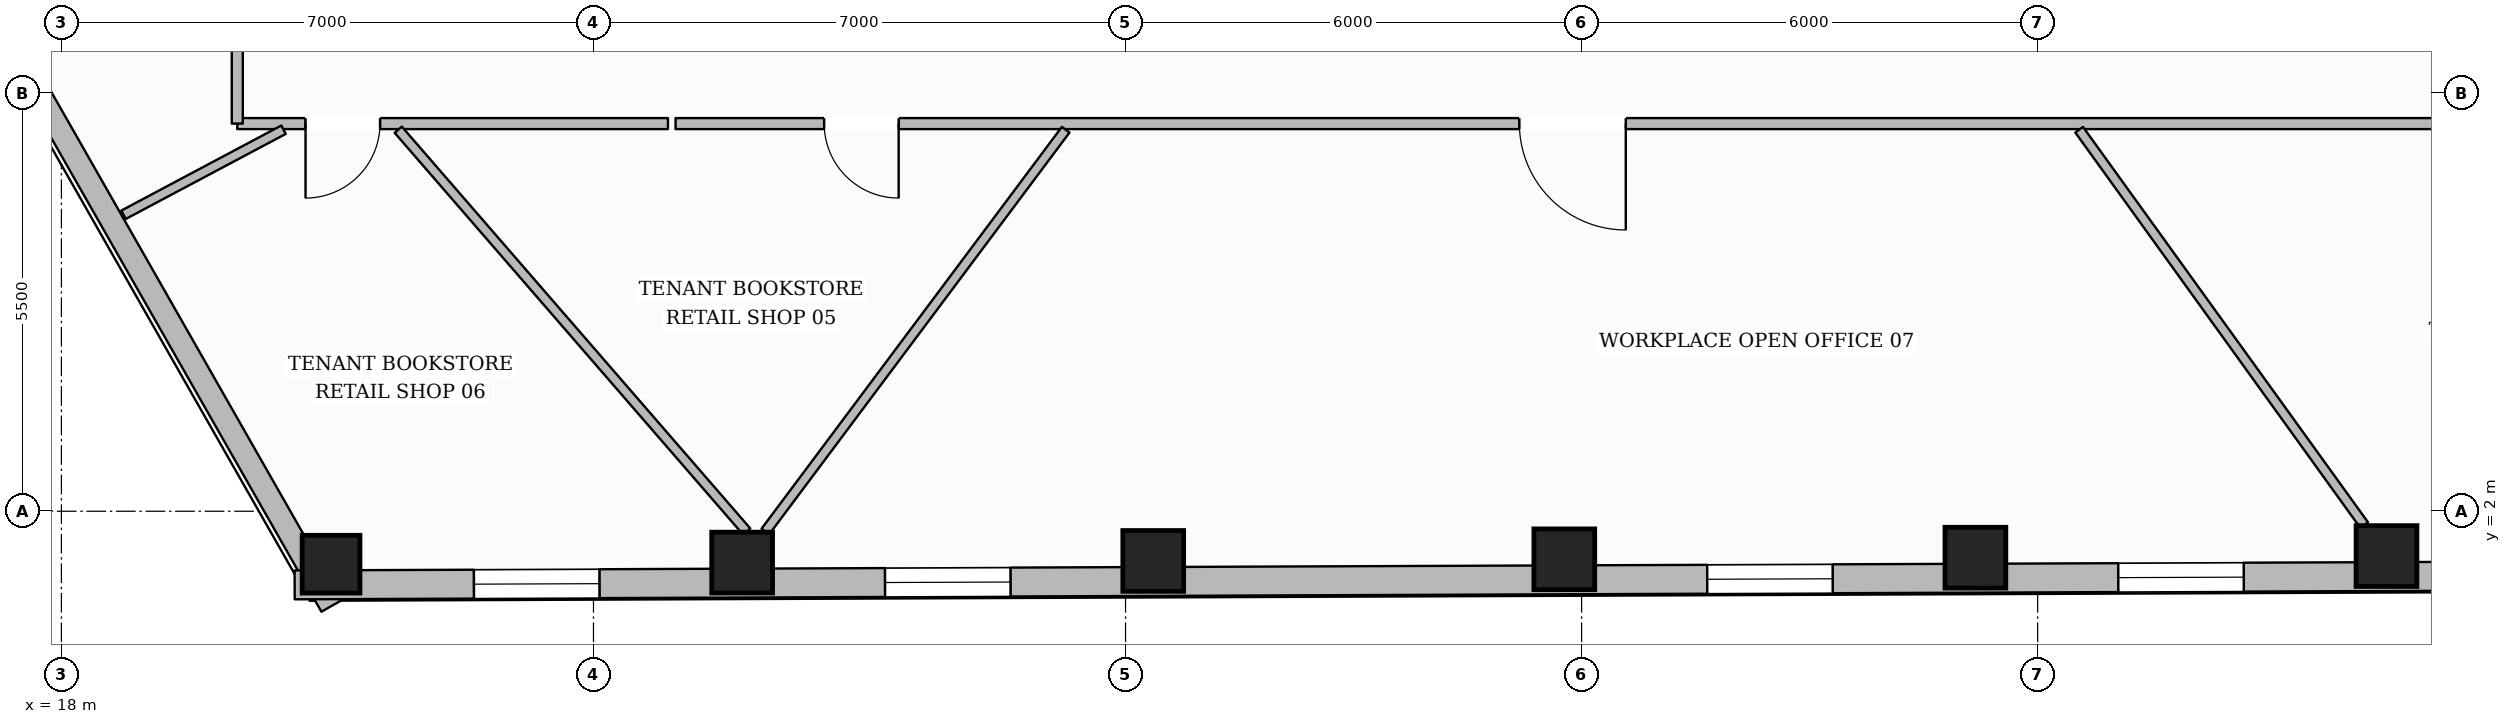
"""IFC4 building model, lengths in metres.
Left out: names, types, materials, properties, quantities, classifications, styles, units other than length and angle.
Written with IfcOpenShell. Run it as: python <this file> out.ifc"""

import sys

from ifc_helpers import new_model, si_unit, direction, frame, frame_2d, origin, origin_2d, place, context, subcontext, project, spatial, rectangle, hollow_rectangle, extrude, element, fill, save


model = new_model("IFC4")
c1 = context("Model", 3, precision=1e-05, world=origin(), true_north=direction((0.0, 1.0)))
c2 = subcontext(c1, "Body", "Model", "MODEL_VIEW")
j1 = project(units=[si_unit("LENGTHUNIT", "METRE"), si_unit("PLANEANGLEUNIT", "RADIAN")], contexts=[c1])
p1 = place(None, origin())
s1 = spatial("IfcSite", under=j1, at=p1, CompositionType="ELEMENT")
p2 = place(p1, origin())
s2 = spatial("IfcBuilding", under=s1, at=p2, CompositionType="ELEMENT")
p3 = place(p2, frame((0.0, 0.0, 13.7)))
s3 = spatial("IfcBuildingStorey", under=s2, at=p3, CompositionType="ELEMENT", Elevation=13.7)
p4 = place(p3, frame((21.548, 1.303, 0.0), z_axis=(0.0, 0.0, 1.0), x_axis=(1.0, 0.0, 0.0)))
e1 = element("IfcColumn", 1, at=p4, inside=s3, PredefinedType="COLUMN", context=c2, shape_type="SweptSolid", body=[
    extrude(hollow_rectangle(XDim=0.76, YDim=0.76, WallThickness=0.035, at=origin_2d()), origin(), (0.0, 0.0, 1.0), 3.59),
])
for number, where, z_axis, x_axis in (
    (2, (26.956, 1.325, 0.0), (0.0, 0.0, 1.0), (1.0, 0.0, 0.0)),
    (3, (32.364, 1.346, 0.0), (0.0, 0.0, 1.0), (1.0, 0.0, 0.0)),
    (4, (37.772, 1.368, 0.0), (0.0, 0.0, 1.0), (1.0, 0.0, 0.0)),
    (5, (43.181, 1.389, 0.0), (0.0, 0.0, 1.0), (1.0, 0.0, 0.0)),
    (6, (48.589, 1.41, 0.0), (0.0, 0.0, 1.0), (1.0, 0.0, 0.0)),
):
    element("IfcColumn", number, at=place(p3, frame(where, z_axis=z_axis, x_axis=x_axis)), inside=s3, PredefinedType="COLUMN", context=c2, shape_type="SweptSolid", body=[
        extrude(hollow_rectangle(XDim=0.8, YDim=0.8, WallThickness=0.036, at=origin_2d()), origin(), (0.0, 0.0, 1.0), 3.59),
    ])
p5 = place(p3, frame((21.551, 0.752, 0.0), z_axis=(0.0, 0.0, 1.0), x_axis=(-0.495301001615, 0.868721427041, 0.0)))
e7 = element("IfcWall", 7, at=p5, inside=s3, PredefinedType="STANDARD", context=c2, shape_type="SweptSolid", body=[
    extrude(rectangle(XDim=17.042, YDim=0.3, at=frame_2d((8.521, 0.0))), origin(), (0.0, 0.0, 1.0), 2.97),
])
p6 = place(p5, frame((7.921, 0.0, 0.65)))
e8 = element("IfcOpeningElement", 8, at=p6, cuts=e7, PredefinedType="OPENING", context=c2, shape_type="SweptSolid", body=[
    extrude(rectangle(XDim=1.2, YDim=1.7, at=frame_2d((0.6, 0.85))), frame((0.0, 0.16, 0.0), z_axis=(0.0, -1.0, 0.0), x_axis=(1.0, 0.0, 0.0)), (0.0, 0.0, 1.0), 0.32),
])
p7 = place(p3, frame((54.475, 1.164, 0.0), z_axis=(0.0, 0.0, 1.0), x_axis=(-0.999992126113, -0.003968338725, 0.0)))
e9 = element("IfcWall", 9, at=p7, inside=s3, PredefinedType="STANDARD", context=c2, shape_type="SweptSolid", body=[
    extrude(rectangle(XDim=33.406, YDim=0.38, at=frame_2d((16.703, 0.0))), origin(), (0.0, 0.0, 1.0), 2.97),
])
p8 = place(p7, frame((29.397, 0.0, 0.65)))
e10 = element("IfcOpeningElement", 10, at=p8, cuts=e9, PredefinedType="OPENING", context=c2, shape_type="SweptSolid", body=[
    extrude(rectangle(XDim=1.65, YDim=1.75, at=frame_2d((0.825, 0.875))), frame((0.0, 0.2, 0.0), z_axis=(0.0, -1.0, 0.0), x_axis=(1.0, 0.0, 0.0)), (0.0, 0.0, 1.0), 0.4),
])
p9 = place(p7, frame((23.989, 0.0, 0.65)))
e11 = element("IfcOpeningElement", 11, at=p9, cuts=e9, PredefinedType="OPENING", context=c2, shape_type="SweptSolid", body=[
    extrude(rectangle(XDim=1.65, YDim=1.75, at=frame_2d((0.825, 0.875))), frame((0.0, 0.2, 0.0), z_axis=(0.0, -1.0, 0.0), x_axis=(1.0, 0.0, 0.0)), (0.0, 0.0, 1.0), 0.4),
])
p10 = place(p7, frame((13.172, 0.0, 0.65)))
e12 = element("IfcOpeningElement", 12, at=p10, cuts=e9, PredefinedType="OPENING", context=c2, shape_type="SweptSolid", body=[
    extrude(rectangle(XDim=1.65, YDim=1.75, at=frame_2d((0.825, 0.875))), frame((0.0, 0.2, 0.0), z_axis=(0.0, -1.0, 0.0), x_axis=(1.0, 0.0, 0.0)), (0.0, 0.0, 1.0), 0.4),
])
p11 = place(p7, frame((7.764, 0.0, 0.65)))
e13 = element("IfcOpeningElement", 13, at=p11, cuts=e9, PredefinedType="OPENING", context=c2, shape_type="SweptSolid", body=[
    extrude(rectangle(XDim=1.65, YDim=1.75, at=frame_2d((0.825, 0.875))), frame((0.0, 0.2, 0.0), z_axis=(0.0, -1.0, 0.0), x_axis=(1.0, 0.0, 0.0)), (0.0, 0.0, 1.0), 0.4),
])
p12 = place(p7, frame((2.355, 0.0, 0.65)))
e14 = element("IfcOpeningElement", 14, at=p12, cuts=e9, PredefinedType="OPENING", context=c2, shape_type="SweptSolid", body=[
    extrude(rectangle(XDim=1.65, YDim=1.75, at=frame_2d((0.825, 0.875))), frame((0.0, 0.2, 0.0), z_axis=(0.0, -1.0, 0.0), x_axis=(1.0, 0.0, 0.0)), (0.0, 0.0, 1.0), 0.4),
])
p13 = place(p3, frame((49.92, 7.1, 0.0), z_axis=(0.0, 0.0, 1.0), x_axis=(-1.0, 0.0, 0.0)))
e15 = element("IfcWall", 15, at=p13, inside=s3, PredefinedType="PARTITIONING", context=c2, shape_type="SweptSolid", body=[
    extrude(rectangle(XDim=23.84, YDim=0.145, at=frame_2d((11.92, 0.0))), origin(), (0.0, 0.0, 1.0), 3.278),
])
p14 = place(p13, frame((20.905, 0.0, 0.0)))
e16 = element("IfcOpeningElement", 16, at=p14, cuts=e15, PredefinedType="OPENING", context=c2, shape_type="SweptSolid", body=[
    extrude(rectangle(XDim=0.98, YDim=2.15, at=frame_2d((0.49, 1.075))), frame((0.0, 0.083, 0.0), z_axis=(0.0, -1.0, 0.0), x_axis=(1.0, 0.0, 0.0)), (0.0, 0.0, 1.0), 0.165),
])
p15 = place(p13, frame((11.339, 0.0, 0.0)))
e17 = element("IfcOpeningElement", 17, at=p15, cuts=e15, PredefinedType="OPENING", context=c2, shape_type="SweptSolid", body=[
    extrude(rectangle(XDim=1.4, YDim=2.2, at=frame_2d((0.7, 1.1))), frame((0.0, 0.083, 0.0), z_axis=(0.0, -1.0, 0.0), x_axis=(1.0, 0.0, 0.0)), (0.0, 0.0, 1.0), 0.165),
])
p16 = place(p3, frame((25.98, 7.1, 0.0), z_axis=(0.0, 0.0, 1.0), x_axis=(-1.0, 0.0, 0.0)))
e18 = element("IfcWall", 18, at=p16, inside=s3, PredefinedType="PARTITIONING", context=c2, shape_type="SweptSolid", body=[
    extrude(rectangle(XDim=5.666, YDim=0.145, at=frame_2d((2.833, 0.0))), origin(), (0.0, 0.0, 1.0), 3.59),
])
p17 = place(p16, frame((3.788, 0.0, 0.0)))
e19 = element("IfcOpeningElement", 19, at=p17, cuts=e18, PredefinedType="OPENING", context=c2, shape_type="SweptSolid", body=[
    extrude(rectangle(XDim=0.98, YDim=2.15, at=frame_2d((0.49, 1.075))), frame((0.0, 0.083, 0.0), z_axis=(0.0, -1.0, 0.0), x_axis=(1.0, 0.0, 0.0)), (0.0, 0.0, 1.0), 0.165),
])
p18 = place(p3, frame((20.314, 7.1, 0.0), z_axis=(0.0, 0.0, 1.0), x_axis=(0.0, 1.0, 0.0)))
e20 = element("IfcWall", 20, at=p18, inside=s3, PredefinedType="PARTITIONING", context=c2, shape_type="SweptSolid", body=[
    extrude(rectangle(XDim=2.0, YDim=0.145, at=frame_2d((1.0, 0.0))), origin(), (0.0, 0.0, 1.0), 3.59),
])
p19 = place(p3, frame((20.922, 7.02, 0.0), z_axis=(0.0, 0.0, 1.0), x_axis=(-0.882964518008, -0.469439729825, 0.0)))
e21 = element("IfcWall", 21, at=p19, inside=s3, PredefinedType="PARTITIONING", context=c2, shape_type="SweptSolid", body=[
    extrude(rectangle(XDim=2.384, YDim=0.125, at=frame_2d((1.192, 0.0))), origin(), (0.0, 0.0, 1.0), 3.59),
])
p20 = place(p3, frame((31.213, 7.02, 0.0), z_axis=(0.0, 0.0, 1.0), x_axis=(-0.598715024462, -0.800962121129, 0.0)))
e22 = element("IfcWall", 22, at=p20, inside=s3, PredefinedType="PARTITIONING", context=c2, shape_type="SweptSolid", body=[
    extrude(rectangle(XDim=6.601, YDim=0.125, at=frame_2d((3.3, 0.0))), origin(), (0.0, 0.0, 1.0), 3.59),
])
p21 = place(p3, frame((44.546, 7.02, 0.0), z_axis=(0.0, 0.0, 1.0), x_axis=(0.584759038679, -0.811207043043, 0.0)))
e23 = element("IfcWall", 23, at=p21, inside=s3, PredefinedType="PARTITIONING", context=c2, shape_type="SweptSolid", body=[
    extrude(rectangle(XDim=6.412, YDim=0.125, at=frame_2d((3.206, 0.0))), origin(), (0.0, 0.0, 1.0), 3.59),
])
p22 = place(p3, frame((22.431, 7.02, 0.0), z_axis=(0.0, 0.0, 1.0), x_axis=(0.655156305275, -0.75549335911, 0.0)))
e24 = element("IfcWall", 24, at=p22, inside=s3, PredefinedType="PARTITIONING", context=c2, shape_type="SweptSolid", body=[
    extrude(rectangle(XDim=6.998, YDim=0.125, at=frame_2d((3.499, 0.0))), origin(), (0.0, 0.0, 1.0), 3.59),
])
p23 = place(p8, origin())
e25 = element("IfcWindow", 25, at=p23, inside=s3, PartitioningType="SINGLE_PANEL", PredefinedType="WINDOW", context=c2, shape_type="SweptSolid", body=[
    extrude(rectangle(XDim=1.65, YDim=1.75, at=frame_2d((0.825, 0.875))), frame((0.0, 0.03, 0.0), z_axis=(0.0, -1.0, 0.0), x_axis=(1.0, 0.0, 0.0)), (0.0, 0.0, 1.0), 0.06),
])
fill(e10, e25)
p24 = place(p9, origin())
e26 = element("IfcWindow", 26, at=p24, inside=s3, PartitioningType="SINGLE_PANEL", PredefinedType="WINDOW", context=c2, shape_type="SweptSolid", body=[
    extrude(rectangle(XDim=1.65, YDim=1.75, at=frame_2d((0.825, 0.875))), frame((0.0, 0.03, 0.0), z_axis=(0.0, -1.0, 0.0), x_axis=(1.0, 0.0, 0.0)), (0.0, 0.0, 1.0), 0.06),
])
fill(e11, e26)
p25 = place(p10, origin())
e27 = element("IfcWindow", 27, at=p25, inside=s3, PartitioningType="SINGLE_PANEL", PredefinedType="WINDOW", context=c2, shape_type="SweptSolid", body=[
    extrude(rectangle(XDim=1.65, YDim=1.75, at=frame_2d((0.825, 0.875))), frame((0.0, 0.03, 0.0), z_axis=(0.0, -1.0, 0.0), x_axis=(1.0, 0.0, 0.0)), (0.0, 0.0, 1.0), 0.06),
])
fill(e12, e27)
p26 = place(p11, origin())
e28 = element("IfcWindow", 28, at=p26, inside=s3, PartitioningType="SINGLE_PANEL", PredefinedType="WINDOW", context=c2, shape_type="SweptSolid", body=[
    extrude(rectangle(XDim=1.65, YDim=1.75, at=frame_2d((0.825, 0.875))), frame((0.0, 0.03, 0.0), z_axis=(0.0, -1.0, 0.0), x_axis=(1.0, 0.0, 0.0)), (0.0, 0.0, 1.0), 0.06),
])
fill(e13, e28)
p27 = place(p14, origin())
e29 = element("IfcDoor", 29, at=p27, inside=s3, OperationType="SINGLE_SWING_LEFT", PredefinedType="DOOR", context=c2, shape_type="SweptSolid", body=[
    extrude(rectangle(XDim=0.98, YDim=2.15, at=frame_2d((0.49, 1.075))), frame((0.0, 0.025, 0.0), z_axis=(0.0, -1.0, 0.0), x_axis=(1.0, 0.0, 0.0)), (0.0, 0.0, 1.0), 0.05),
])
fill(e16, e29)
p28 = place(p17, origin())
e30 = element("IfcDoor", 30, at=p28, inside=s3, OperationType="SINGLE_SWING_RIGHT", PredefinedType="DOOR", context=c2, shape_type="SweptSolid", body=[
    extrude(rectangle(XDim=0.98, YDim=2.15, at=frame_2d((0.49, 1.075))), frame((0.0, 0.025, 0.0), z_axis=(0.0, -1.0, 0.0), x_axis=(1.0, 0.0, 0.0)), (0.0, 0.0, 1.0), 0.05),
])
fill(e19, e30)
p29 = place(p15, origin())
e31 = element("IfcDoor", 31, at=p29, inside=s3, OperationType="SINGLE_SWING_LEFT", PredefinedType="DOOR", context=c2, shape_type="SweptSolid", body=[
    extrude(rectangle(XDim=1.4, YDim=2.2, at=frame_2d((0.7, 1.1))), frame((0.0, 0.025, 0.0), z_axis=(0.0, -1.0, 0.0), x_axis=(1.0, 0.0, 0.0)), (0.0, 0.0, 1.0), 0.05),
])
fill(e17, e31)
save(model, sys.argv[1])
